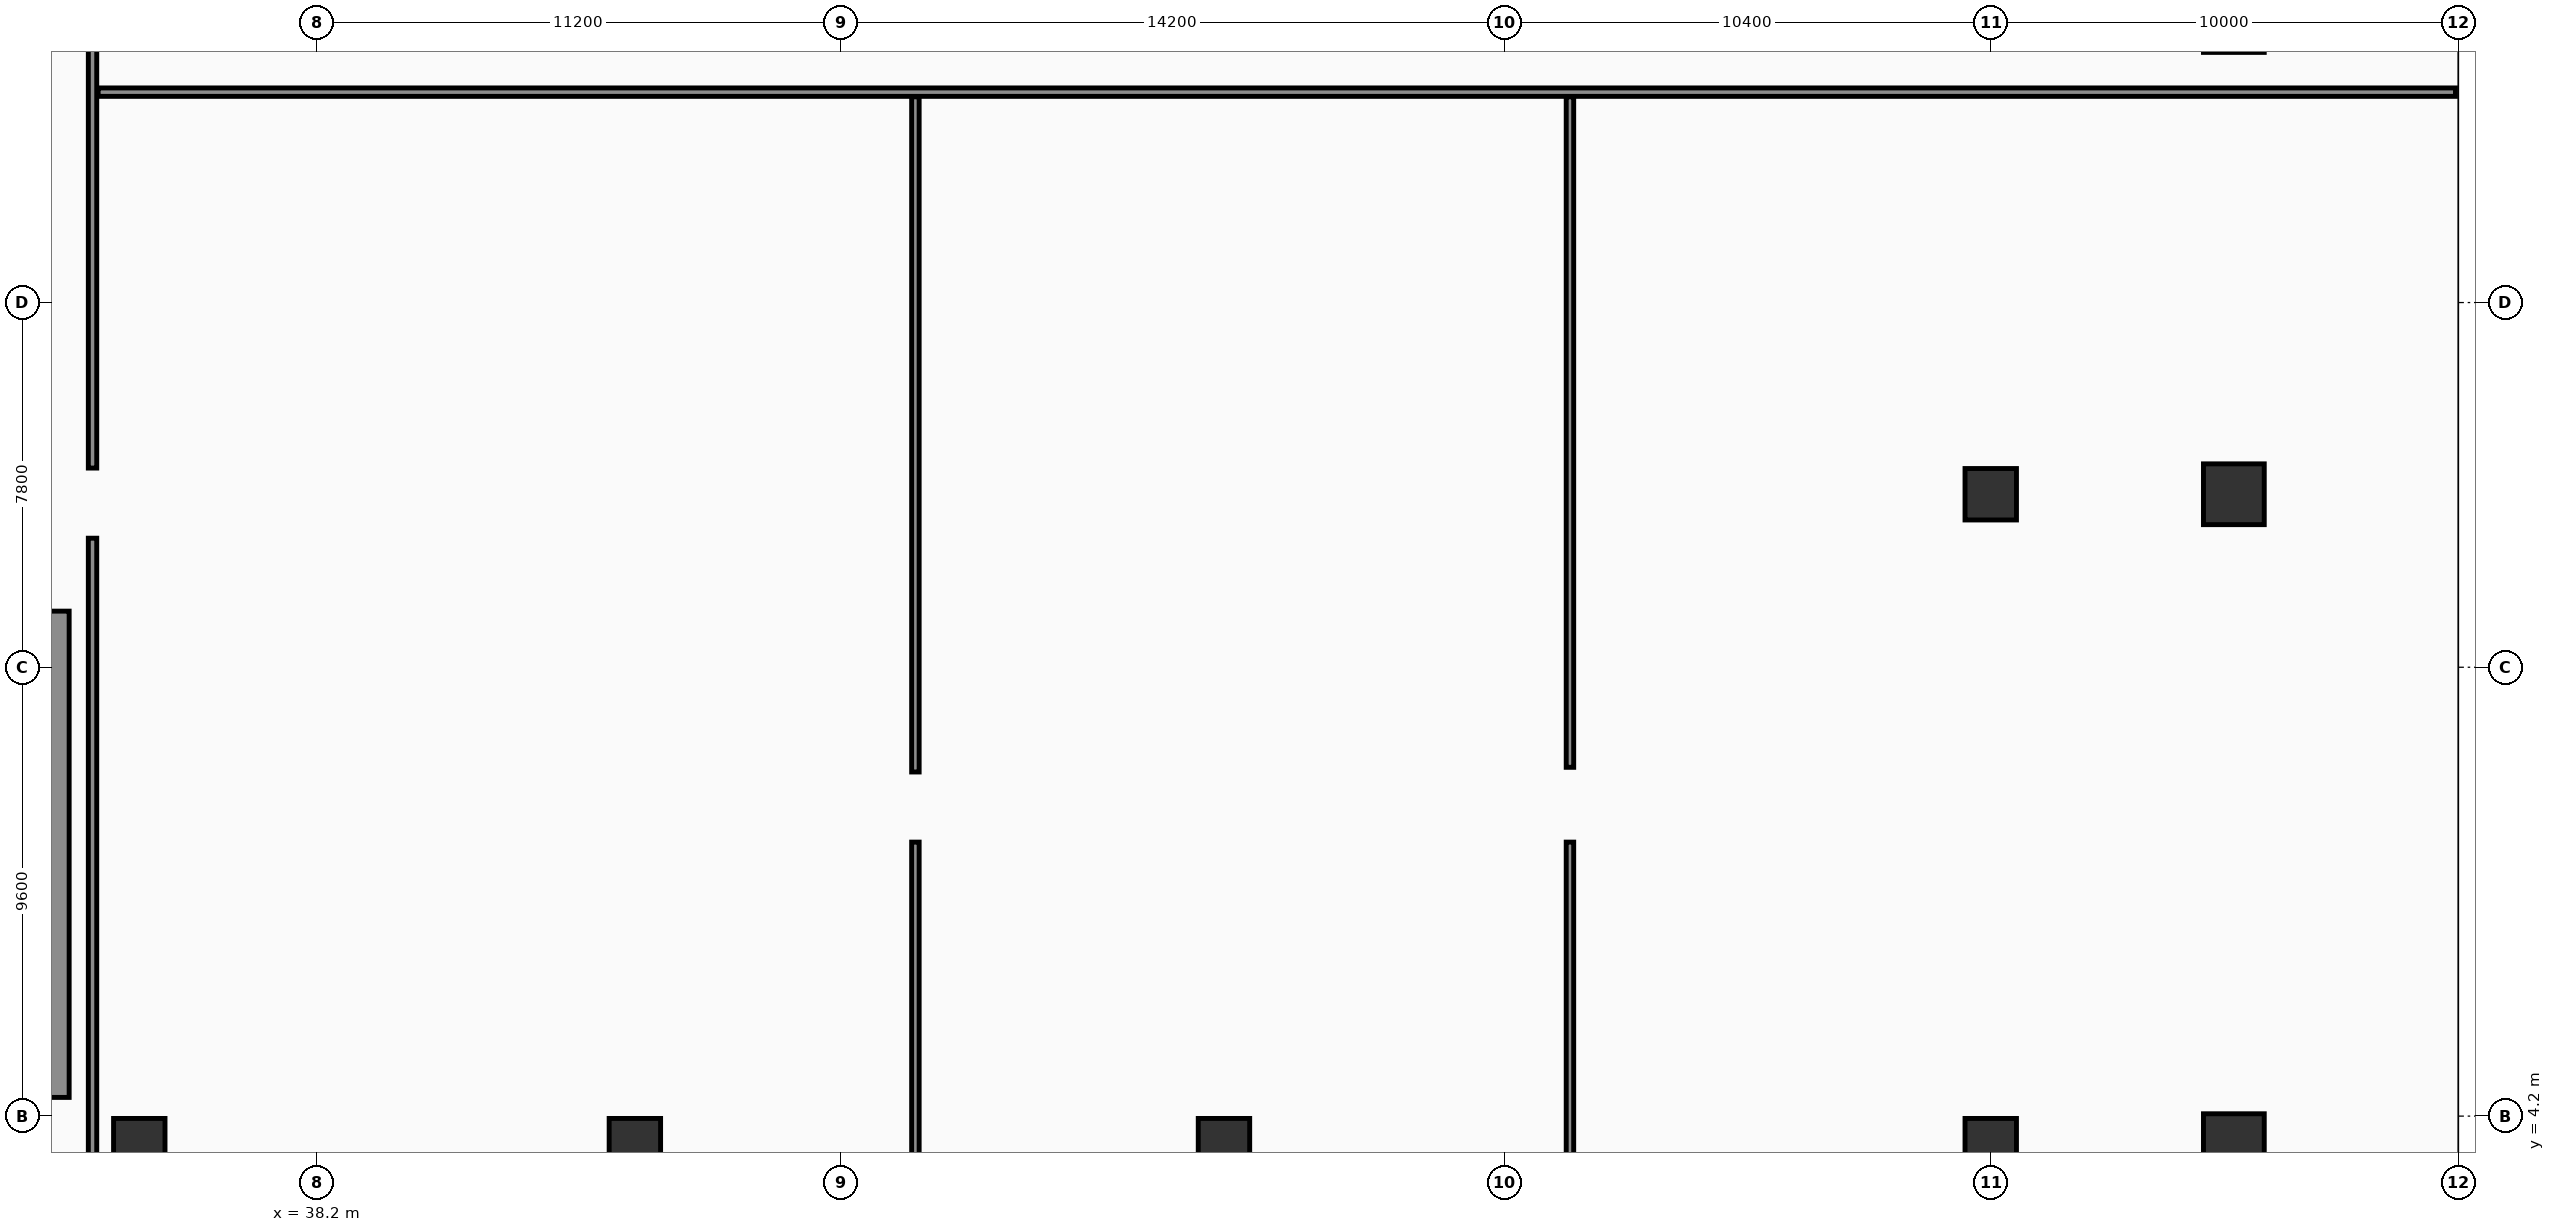
"""IFC4 building model, lengths in metres.
Left out: names, types, materials, properties, quantities, classifications, styles, units other than length and angle.
Written with IfcOpenShell. Run it as: python <this file> out.ifc"""

import sys

from ifc_helpers import new_model, si_unit, direction, frame, frame_2d, origin, origin_2d, place, context, subcontext, project, spatial, rectangle, hollow_rectangle, circle, extrude, element, fill, save


model = new_model("IFC4")
c1 = context("Model", 3, precision=1e-05, world=origin(), true_north=direction((0.0, 1.0)))
c2 = subcontext(c1, "Body", "Model", "MODEL_VIEW")
j1 = project(units=[si_unit("LENGTHUNIT", "METRE"), si_unit("PLANEANGLEUNIT", "RADIAN")], contexts=[c1])
p1 = place(None, origin())
s1 = spatial("IfcSite", under=j1, at=p1, CompositionType="ELEMENT")
p2 = place(p1, origin())
s2 = spatial("IfcBuilding", under=s1, at=p2, CompositionType="ELEMENT")
p3 = place(p2, frame((0.0, 0.0, 12.0)))
s3 = spatial("IfcBuildingStorey", under=s2, at=p3, CompositionType="ELEMENT", Elevation=12.0)
p4 = place(p3, frame((32.4, 4.6, 0.0), z_axis=(0.0, 0.0, 1.0), x_axis=(0.0, 1.0, 0.0)))
e1 = element("IfcWall", 1, at=p4, inside=s3, PredefinedType="SHEAR", context=c2, shape_type="SweptSolid", body=[
    extrude(rectangle(XDim=10.4, YDim=1.0, at=frame_2d((5.2, 0.0))), origin(), (0.0, 0.0, 1.0), 4.68),
])
for number, where, z_axis, x_axis in (
    (2, (34.4, 3.6, 0.0), (0.0, 0.0, 1.0), (1.0, 0.0, 0.0)),
    (3, (45.0, 3.6, 0.0), (0.0, 0.0, 1.0), (1.0, 0.0, 0.0)),
    (4, (57.6, 3.6, 0.0), (0.0, 0.0, 1.0), (1.0, 0.0, 0.0)),
    (5, (74.0, 3.6, 0.0), (0.0, 0.0, 1.0), (1.0, 0.0, 0.0)),
    (6, (74.0, 17.5, 0.0), (0.0, 0.0, 1.0), (1.0, 0.0, 0.0)),
):
    element("IfcColumn", number, at=place(p3, frame(where, z_axis=z_axis, x_axis=x_axis)), inside=s3, PredefinedType="COLUMN", context=c2, shape_type="SweptSolid", body=[
        extrude(hollow_rectangle(XDim=1.1, YDim=1.1, WallThickness=0.045, at=origin_2d()), origin(), (0.0, 0.0, 1.0), 4.68),
    ])
for number, where, z_axis, x_axis in (
    (7, (79.2, 3.6, 0.0), (0.0, 0.0, 1.0), (1.0, 0.0, 0.0)),
    (8, (79.2, 17.5, 0.0), (0.0, 0.0, 1.0), (1.0, 0.0, 0.0)),
    (9, (79.2, 27.6, 0.0), (0.0, 0.0, 1.0), (1.0, 0.0, 0.0)),
):
    element("IfcColumn", number, at=place(p3, frame(where, z_axis=z_axis, x_axis=x_axis)), inside=s3, PredefinedType="COLUMN", context=c2, shape_type="SweptSolid", body=[
        extrude(circle(Radius=0.65, at=origin_2d()), origin(), (0.0, 0.0, 1.0), 4.68),
    ])
p5 = place(p3, frame((33.4, 0.06, 0.0), z_axis=(0.0, 0.0, 1.0), x_axis=(0.0, 1.0, 0.0)))
e10 = element("IfcWall", 10, at=p5, inside=s3, PredefinedType="PARTITIONING", context=c2, shape_type="SweptSolid", body=[
    extrude(rectangle(XDim=57.88, YDim=0.18, at=frame_2d((28.94, 0.0))), origin(), (0.0, 0.0, 1.0), 3.88),
])
p6 = place(p5, frame((16.5, 0.0, 0.0)))
e11 = element("IfcOpeningElement", 11, at=p6, cuts=e10, PredefinedType="OPENING", context=c2, shape_type="SweptSolid", body=[
    extrude(rectangle(XDim=1.5, YDim=2.22, at=frame_2d((0.75, 1.11))), frame((0.0, 0.1, 0.0), z_axis=(0.0, -1.0, 0.0), x_axis=(1.0, 0.0, 0.0)), (0.0, 0.0, 1.0), 0.2),
])
p7 = place(p5, frame((30.0, 0.0, 0.0)))
e12 = element("IfcOpeningElement", 12, at=p7, cuts=e10, PredefinedType="OPENING", context=c2, shape_type="SweptSolid", body=[
    extrude(rectangle(XDim=1.6, YDim=2.35, at=frame_2d((0.8, 1.175))), frame((0.0, 0.1, 0.0), z_axis=(0.0, -1.0, 0.0), x_axis=(1.0, 0.0, 0.0)), (0.0, 0.0, 1.0), 0.2),
])
p8 = place(p3, frame((51.0, 0.06, 0.0), z_axis=(0.0, 0.0, 1.0), x_axis=(0.0, 1.0, 0.0)))
e13 = element("IfcWall", 13, at=p8, inside=s3, PredefinedType="PARTITIONING", context=c2, shape_type="SweptSolid", body=[
    extrude(rectangle(XDim=25.94, YDim=0.16, at=frame_2d((12.97, 0.0))), origin(), (0.0, 0.0, 1.0), 4.18),
])
p9 = place(p8, frame((10.0, 0.0, 0.0)))
e14 = element("IfcOpeningElement", 14, at=p9, cuts=e13, PredefinedType="OPENING", context=c2, shape_type="SweptSolid", body=[
    extrude(rectangle(XDim=1.5, YDim=2.22, at=frame_2d((0.75, 1.11))), frame((0.0, 0.09, 0.0), z_axis=(0.0, -1.0, 0.0), x_axis=(1.0, 0.0, 0.0)), (0.0, 0.0, 1.0), 0.18),
])
p10 = place(p3, frame((65.0, 0.06, 0.0), z_axis=(0.0, 0.0, 1.0), x_axis=(0.0, 1.0, 0.0)))
e15 = element("IfcWall", 15, at=p10, inside=s3, PredefinedType="PARTITIONING", context=c2, shape_type="SweptSolid", body=[
    extrude(rectangle(XDim=25.94, YDim=0.16, at=frame_2d((12.97, 0.0))), origin(), (0.0, 0.0, 1.0), 4.18),
])
p11 = place(p10, frame((10.0, 0.0, 0.0)))
e16 = element("IfcOpeningElement", 16, at=p11, cuts=e15, PredefinedType="OPENING", context=c2, shape_type="SweptSolid", body=[
    extrude(rectangle(XDim=1.6, YDim=2.35, at=frame_2d((0.8, 1.175))), frame((0.0, 0.09, 0.0), z_axis=(0.0, -1.0, 0.0), x_axis=(1.0, 0.0, 0.0)), (0.0, 0.0, 1.0), 0.18),
])
p12 = place(p3, frame((33.52, 26.1, 0.0), z_axis=(0.0, 0.0, 1.0), x_axis=(1.0, 0.0, 0.0)))
e17 = element("IfcWall", 17, at=p12, inside=s3, PredefinedType="PARTITIONING", context=c2, shape_type="SweptSolid", body=[
    extrude(rectangle(XDim=50.42, YDim=0.18, at=frame_2d((25.21, 0.0))), origin(), (0.0, 0.0, 1.0), 3.18),
])
p13 = place(p6, origin())
e18 = element("IfcDoor", 18, at=p13, inside=s3, OperationType="SINGLE_SWING_LEFT", PredefinedType="DOOR", context=c2, shape_type="SweptSolid", body=[
    extrude(rectangle(XDim=1.5, YDim=2.22, at=frame_2d((0.75, 1.11))), frame((0.0, 0.025, 0.0), z_axis=(0.0, -1.0, 0.0), x_axis=(1.0, 0.0, 0.0)), (0.0, 0.0, 1.0), 0.05),
])
fill(e11, e18)
p14 = place(p9, origin())
e19 = element("IfcDoor", 19, at=p14, inside=s3, OperationType="SINGLE_SWING_LEFT", PredefinedType="DOOR", context=c2, shape_type="SweptSolid", body=[
    extrude(rectangle(XDim=1.5, YDim=2.22, at=frame_2d((0.75, 1.11))), frame((0.0, 0.025, 0.0), z_axis=(0.0, -1.0, 0.0), x_axis=(1.0, 0.0, 0.0)), (0.0, 0.0, 1.0), 0.05),
])
fill(e14, e19)
p15 = place(p11, origin())
e20 = element("IfcDoor", 20, at=p15, inside=s3, OperationType="SINGLE_SWING_LEFT", PredefinedType="DOOR", context=c2, shape_type="SweptSolid", body=[
    extrude(rectangle(XDim=1.6, YDim=2.35, at=frame_2d((0.8, 1.175))), frame((0.0, 0.025, 0.0), z_axis=(0.0, -1.0, 0.0), x_axis=(1.0, 0.0, 0.0)), (0.0, 0.0, 1.0), 0.05),
])
fill(e16, e20)
save(model, sys.argv[1])
